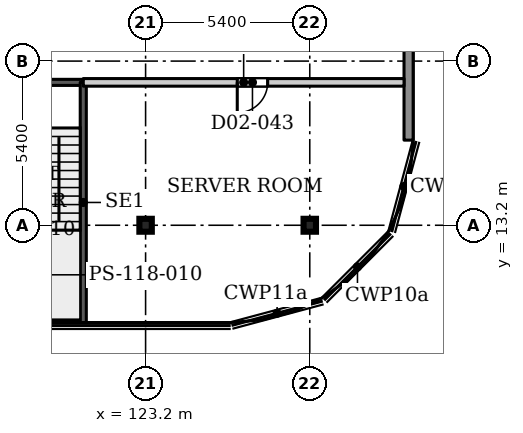
"""IFC4 building model, lengths in metres.
Left out: names, types, materials, properties, quantities, classifications, styles, units other than length and angle.
Written with IfcOpenShell. Run it as: python <this file> out.ifc"""

import sys

from ifc_helpers import new_model, si_unit, direction, frame, frame_2d, origin, origin_2d, place, context, subcontext, project, spatial, rectangle, i_section, extrude, source, transform, mapped, element, fill, save


model = new_model("IFC4")
c1 = context("Model", 3, precision=1e-05, world=origin(), true_north=direction((0.0, 1.0)))
c2 = subcontext(c1, "Body", "Model", "MODEL_VIEW")
j1 = project(units=[si_unit("LENGTHUNIT", "METRE"), si_unit("PLANEANGLEUNIT", "RADIAN")], contexts=[c1])
p1 = place(None, origin())
s1 = spatial("IfcSite", under=j1, at=p1, CompositionType="ELEMENT")
p2 = place(p1, origin())
s2 = spatial("IfcBuilding", under=s1, at=p2, CompositionType="ELEMENT")
p3 = place(p2, frame((0.0, 0.0, 12.5)))
s3 = spatial("IfcBuildingStorey", under=s2, at=p3, CompositionType="ELEMENT", Elevation=12.5)
for number, where, z_axis, x_axis in (
    (1, (123.2, 13.2, 0.0), (0.0, 0.0, 1.0), (1.0, 0.0, 0.0)),
    (2, (128.6, 13.2, 0.0), (0.0, 0.0, 1.0), (1.0, 0.0, 0.0)),
):
    element("IfcColumn", number, at=place(p3, frame(where, z_axis=z_axis, x_axis=x_axis)), inside=s3, PredefinedType="COLUMN", context=c2, shape_type="SweptSolid", body=[
        extrude(i_section(OverallWidth=0.409, OverallDepth=0.425, WebThickness=0.033, FlangeThickness=0.052, FilletRadius=0.013, at=origin_2d()), origin(), (0.0, 0.0, 1.0), 4.5),
    ])
p4 = place(p3, frame((131.85, 54.72, 0.0), z_axis=(0.0, 0.0, 1.0), x_axis=(0.0, -1.0, 0.0)))
e3 = element("IfcWall", 3, at=p4, inside=s3, PredefinedType="SOLIDWALL", context=c2, shape_type="SweptSolid", body=[
    extrude(rectangle(XDim=38.72, YDim=0.3, at=frame_2d((19.36, 0.0))), origin(), (0.0, 0.0, 1.0), 4.25),
])
p5 = place(p4, frame((2.435, 0.0, 0.9)))
e4 = element("IfcOpeningElement", 4, at=p5, cuts=e3, PredefinedType="OPENING", context=c2, shape_type="SweptSolid", body=[
    extrude(rectangle(XDim=2.7, YDim=2.1, at=frame_2d((1.35, 1.05))), frame((0.0, 0.16, 0.0), z_axis=(0.0, -1.0, 0.0), x_axis=(1.0, 0.0, 0.0)), (0.0, 0.0, 1.0), 0.32),
])
p6 = place(p4, frame((13.58, 0.0, 0.9)))
e5 = element("IfcOpeningElement", 5, at=p6, cuts=e3, PredefinedType="OPENING", context=c2, shape_type="SweptSolid", body=[
    extrude(rectangle(XDim=2.7, YDim=2.1, at=frame_2d((1.35, 1.05))), frame((0.0, 0.16, 0.0), z_axis=(0.0, -1.0, 0.0), x_axis=(1.0, 0.0, 0.0)), (0.0, 0.0, 1.0), 0.32),
])
p7 = place(p4, frame((26.16, 0.0, 0.9)))
e6 = element("IfcOpeningElement", 6, at=p7, cuts=e3, PredefinedType="OPENING", context=c2, shape_type="SweptSolid", body=[
    extrude(rectangle(XDim=2.7, YDim=2.1, at=frame_2d((1.35, 1.05))), frame((0.0, 0.16, 0.0), z_axis=(0.0, -1.0, 0.0), x_axis=(1.0, 0.0, 0.0)), (0.0, 0.0, 1.0), 0.32),
])
p8 = place(p3, frame((118.0, 17.9, 0.0), z_axis=(0.0, 0.0, 1.0), x_axis=(1.0, 0.0, 0.0)))
e7 = element("IfcWall", 7, at=p8, inside=s3, PredefinedType="SHEAR", context=c2, shape_type="SweptSolid", body=[
    extrude(rectangle(XDim=3.15, YDim=0.2, at=frame_2d((1.575, 0.0))), origin(), (0.0, 0.0, 1.0), 4.5),
])
p9 = place(p8, frame((0.95, 0.0, 0.0)))
e8 = element("IfcOpeningElement", 8, at=p9, cuts=e7, PredefinedType="OPENING", context=c2, shape_type="SweptSolid", body=[
    extrude(rectangle(XDim=1.1, YDim=2.2, at=frame_2d((0.55, 1.1))), frame((0.0, 0.11, 0.0), z_axis=(0.0, -1.0, 0.0), x_axis=(1.0, 0.0, 0.0)), (0.0, 0.0, 1.0), 0.22),
])
p10 = place(p3, frame((121.15, 10.0, 0.0), z_axis=(0.0, 0.0, 1.0), x_axis=(0.0, 1.0, 0.0)))
e9 = element("IfcWall", 9, at=p10, inside=s3, PredefinedType="SHEAR", context=c2, shape_type="SweptSolid", body=[
    extrude(rectangle(XDim=7.9, YDim=0.2, at=frame_2d((3.95, 0.0))), origin(), (0.0, 0.0, 1.0), 4.5),
])
p11 = place(p3, frame((121.15, 17.9, 0.0), z_axis=(0.0, 0.0, 1.0), x_axis=(1.0, 0.0, 0.0)))
e10 = element("IfcWall", 10, at=p11, inside=s3, PredefinedType="PARTITIONING", context=c2, shape_type="SweptSolid", body=[
    extrude(rectangle(XDim=10.551, YDim=0.25, at=frame_2d((5.275, 0.0))), origin(), (0.0, 0.0, 1.0), 4.18),
])
p12 = place(p11, frame((5.065, 0.0, 0.0)))
e11 = element("IfcOpeningElement", 11, at=p12, cuts=e10, PredefinedType="OPENING", context=c2, shape_type="SweptSolid", body=[
    extrude(rectangle(XDim=1.0, YDim=2.1, at=frame_2d((0.5, 1.05))), frame((0.0, 0.135, 0.0), z_axis=(0.0, -1.0, 0.0), x_axis=(1.0, 0.0, 0.0)), (0.0, 0.0, 1.0), 0.27),
])
m1 = source(origin(), c2, "Body", "SweptSolid", [
    extrude(rectangle(XDim=1.0, YDim=2.1, at=frame_2d((0.5, 1.05))), frame((0.0, 0.025, 0.0), z_axis=(0.0, -1.0, 0.0), x_axis=(1.0, 0.0, 0.0)), (0.0, 0.0, 1.0), 0.05),
])
p13 = place(p12, origin())
e12 = element("IfcDoor", 12, at=p13, inside=s3, OperationType="SINGLE_SWING_RIGHT", PredefinedType="DOOR", context=c2, shape_type="MappedRepresentation", body=[
    mapped(m1, transform((0.0, 0.0, 0.0), x_axis=(1.0, 0.0, 0.0), y_axis=(0.0, 1.0, 0.0), z_axis=(0.0, 0.0, 1.0), scale=1.0)),
])
fill(e11, e12)
save(model, sys.argv[1])
